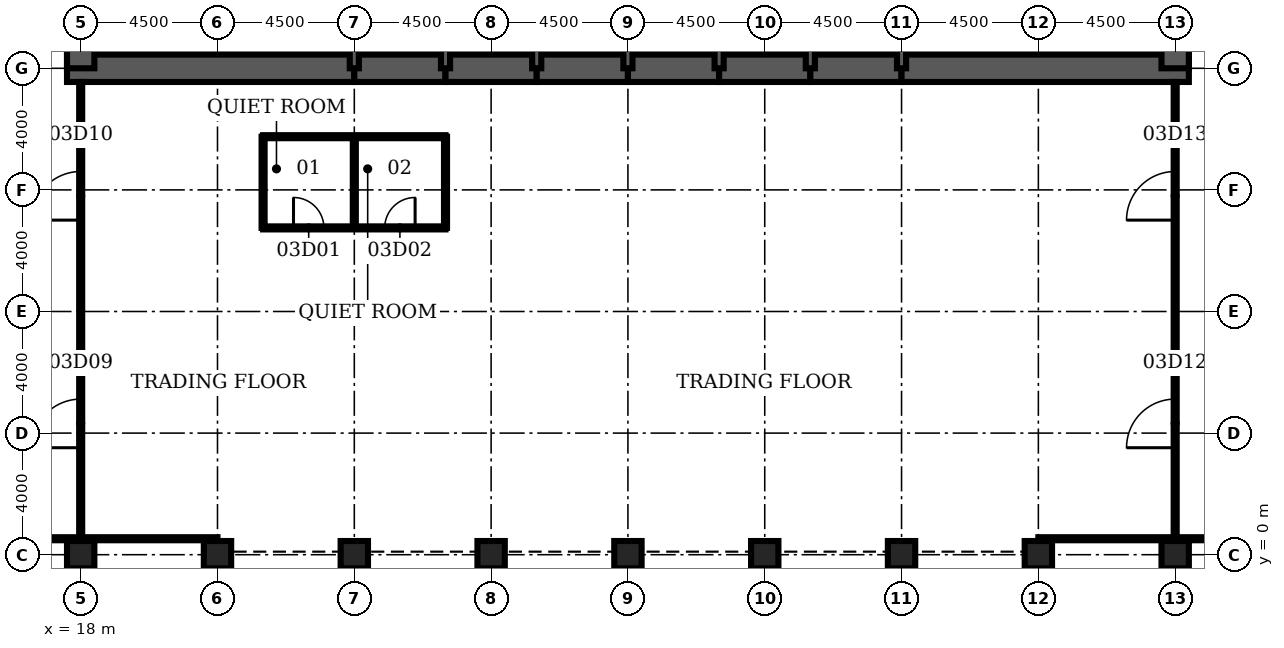
"""IFC4 building model, lengths in metres.
Left out: names, types, materials, properties, quantities, classifications, styles, units other than length and angle.
Written with IfcOpenShell. Run it as: python <this file> out.ifc"""

import sys

from ifc_helpers import new_model, si_unit, direction, frame, frame_2d, origin, origin_2d, place, context, subcontext, project, spatial, rectangle, hollow_rectangle, extrude, element, fill, save


model = new_model("IFC4")
c1 = context("Model", 3, precision=1e-05, world=origin(), true_north=direction((0.0, 1.0)))
c2 = subcontext(c1, "Body", "Model", "MODEL_VIEW")
j1 = project(units=[si_unit("LENGTHUNIT", "METRE"), si_unit("PLANEANGLEUNIT", "RADIAN")], contexts=[c1])
p1 = place(None, origin())
s1 = spatial("IfcSite", under=j1, at=p1, CompositionType="ELEMENT")
p2 = place(p1, origin())
s2 = spatial("IfcBuilding", under=s1, at=p2, CompositionType="ELEMENT")
p3 = place(p2, frame((0.0, 0.0, 18.0)))
s3 = spatial("IfcBuildingStorey", under=s2, at=p3, CompositionType="ELEMENT", Elevation=18.0)
for number, where, z_axis, x_axis in (
    (1, (18.0, 0.0, 0.0), (0.0, 0.0, 1.0), (0.0, 1.0, 0.0)),
    (2, (22.5, 0.0, 0.0), (0.0, 0.0, 1.0), (0.0, 1.0, 0.0)),
    (3, (27.0, 0.0, 0.0), (0.0, 0.0, 1.0), (0.0, 1.0, 0.0)),
    (4, (31.5, 0.0, 0.0), (0.0, 0.0, 1.0), (0.0, 1.0, 0.0)),
    (5, (36.0, 0.0, 0.0), (0.0, 0.0, 1.0), (0.0, 1.0, 0.0)),
    (6, (40.5, 0.0, 0.0), (0.0, 0.0, 1.0), (0.0, 1.0, 0.0)),
    (7, (45.0, 0.0, 0.0), (0.0, 0.0, 1.0), (0.0, 1.0, 0.0)),
    (8, (49.5, 0.0, 0.0), (0.0, 0.0, 1.0), (0.0, 1.0, 0.0)),
    (9, (54.0, 0.0, 0.0), (0.0, 0.0, 1.0), (0.0, 1.0, 0.0)),
):
    element("IfcColumn", number, at=place(p3, frame(where, z_axis=z_axis, x_axis=x_axis)), inside=s3, PredefinedType="COLUMN", context=c2, shape_type="SweptSolid", body=[
        extrude(hollow_rectangle(XDim=0.9, YDim=0.9, WallThickness=0.12, at=origin_2d()), origin(), (0.0, 0.0, 1.0), 5.0),
    ])
p4 = place(p3, frame((17.55, 16.0, 0.0), z_axis=(0.0, 0.0, 1.0), x_axis=(1.0, 0.0, 0.0)))
e10 = element("IfcWall", 10, at=p4, inside=s3, PredefinedType="SHEAR", context=c2, shape_type="SweptSolid", body=[
    extrude(rectangle(XDim=9.45, YDim=0.9, at=frame_2d((4.725, 0.0))), origin(), (0.0, 0.0, 1.0), 5.0),
])
for number, where, z_axis, x_axis in (
    (11, (27.0, 16.0, 0.0), (0.0, 0.0, 1.0), (1.0, 0.0, 0.0)),
    (12, (30.0, 16.0, 0.0), (0.0, 0.0, 1.0), (1.0, 0.0, 0.0)),
    (13, (33.0, 16.0, 0.0), (0.0, 0.0, 1.0), (1.0, 0.0, 0.0)),
    (14, (36.0, 16.0, 0.0), (0.0, 0.0, 1.0), (1.0, 0.0, 0.0)),
    (15, (39.0, 16.0, 0.0), (0.0, 0.0, 1.0), (1.0, 0.0, 0.0)),
    (16, (42.0, 16.0, 0.0), (0.0, 0.0, 1.0), (1.0, 0.0, 0.0)),
):
    element("IfcWall", number, at=place(p3, frame(where, z_axis=z_axis, x_axis=x_axis)), inside=s3, PredefinedType="SHEAR", context=c2, shape_type="SweptSolid", body=[
        extrude(rectangle(XDim=3.0, YDim=0.9, at=frame_2d((1.5, 0.0))), origin(), (0.0, 0.0, 1.0), 5.0),
    ])
p5 = place(p3, frame((45.0, 16.0, 0.0), z_axis=(0.0, 0.0, 1.0), x_axis=(1.0, 0.0, 0.0)))
e17 = element("IfcWall", 17, at=p5, inside=s3, PredefinedType="SHEAR", context=c2, shape_type="SweptSolid", body=[
    extrude(rectangle(XDim=9.45, YDim=0.9, at=frame_2d((4.725, 0.0))), origin(), (0.0, 0.0, 1.0), 5.0),
])
for number, where, z_axis, x_axis in (
    (18, (18.0, 19.2, 0.0), (0.0, 0.0, 1.0), (0.0, -1.0, 0.0)),
    (19, (54.0, 16.0, 0.0), (0.0, 0.0, 1.0), (0.0, 1.0, 0.0)),
):
    element("IfcWall", number, at=place(p3, frame(where, z_axis=z_axis, x_axis=x_axis)), inside=s3, PredefinedType="SHEAR", context=c2, shape_type="SweptSolid", body=[
        extrude(rectangle(XDim=3.2, YDim=0.9, at=frame_2d((1.6, 0.0))), origin(), (0.0, 0.0, 1.0), 5.0),
    ])
for number, where, z_axis, x_axis in (
    (20, (27.0, 16.0, 0.0), (0.0, 0.0, 1.0), (0.0, 1.0, 0.0)),
    (21, (30.0, 16.0, 0.0), (0.0, 0.0, 1.0), (0.0, 1.0, 0.0)),
    (22, (33.0, 16.0, 0.0), (0.0, 0.0, 1.0), (0.0, 1.0, 0.0)),
    (23, (36.0, 16.0, 0.0), (0.0, 0.0, 1.0), (0.0, 1.0, 0.0)),
    (24, (39.0, 16.0, 0.0), (0.0, 0.0, 1.0), (0.0, 1.0, 0.0)),
    (25, (42.0, 16.0, 0.0), (0.0, 0.0, 1.0), (0.0, 1.0, 0.0)),
    (26, (45.0, 16.0, 0.0), (0.0, 0.0, 1.0), (0.0, 1.0, 0.0)),
):
    element("IfcWall", number, at=place(p3, frame(where, z_axis=z_axis, x_axis=x_axis)), inside=s3, PredefinedType="SOLIDWALL", context=c2, shape_type="SweptSolid", body=[
        extrude(rectangle(XDim=3.2, YDim=0.3, at=frame_2d((1.6, 0.0))), origin(), (0.0, 0.0, 1.0), 5.0),
    ])
p6 = place(p3, frame((24.0, 10.75, 0.0), z_axis=(0.0, 0.0, 1.0), x_axis=(1.0, 0.0, 0.0)))
e27 = element("IfcWall", 27, at=p6, inside=s3, PredefinedType="PARTITIONING", context=c2, shape_type="SweptSolid", body=[
    extrude(rectangle(XDim=6.0, YDim=0.1, at=frame_2d((3.0, 0.0))), origin(), (0.0, 0.0, 1.0), 3.0),
])
p7 = place(p6, frame((1.0, 0.0, 0.0)))
e28 = element("IfcOpeningElement", 28, at=p7, cuts=e27, PredefinedType="OPENING", context=c2, shape_type="SweptSolid", body=[
    extrude(rectangle(XDim=1.0, YDim=2.1, at=frame_2d((0.5, 1.05))), frame((0.0, 0.06, 0.0), z_axis=(0.0, -1.0, 0.0), x_axis=(1.0, 0.0, 0.0)), (0.0, 0.0, 1.0), 0.12),
])
p8 = place(p6, frame((4.0, 0.0, 0.0)))
e29 = element("IfcOpeningElement", 29, at=p8, cuts=e27, PredefinedType="OPENING", context=c2, shape_type="SweptSolid", body=[
    extrude(rectangle(XDim=1.0, YDim=2.1, at=frame_2d((0.5, 1.05))), frame((0.0, 0.06, 0.0), z_axis=(0.0, -1.0, 0.0), x_axis=(1.0, 0.0, 0.0)), (0.0, 0.0, 1.0), 0.12),
])
p9 = place(p3, frame((24.0, 13.75, 0.0), z_axis=(0.0, 0.0, 1.0), x_axis=(1.0, 0.0, 0.0)))
e30 = element("IfcWall", 30, at=p9, inside=s3, PredefinedType="PARTITIONING", context=c2, shape_type="SweptSolid", body=[
    extrude(rectangle(XDim=6.0, YDim=0.1, at=frame_2d((3.0, 0.0))), origin(), (0.0, 0.0, 1.0), 3.0),
])
p10 = place(p3, frame((18.0, 0.575, 0.0), z_axis=(0.0, 0.0, 1.0), x_axis=(0.0, 1.0, 0.0)))
e31 = element("IfcWall", 31, at=p10, inside=s3, PredefinedType="PARTITIONING", context=c2, shape_type="SweptSolid", body=[
    extrude(rectangle(XDim=14.975, YDim=0.1, at=frame_2d((7.488, 0.0))), origin(), (0.0, 0.0, 1.0), 3.0),
])
p11 = place(p10, frame((2.944, 0.0, 0.0)))
e32 = element("IfcOpeningElement", 32, at=p11, cuts=e31, PredefinedType="OPENING", context=c2, shape_type="SweptSolid", body=[
    extrude(rectangle(XDim=1.6, YDim=2.1, at=frame_2d((0.8, 1.05))), frame((0.0, 0.06, 0.0), z_axis=(0.0, -1.0, 0.0), x_axis=(1.0, 0.0, 0.0)), (0.0, 0.0, 1.0), 0.12),
])
p12 = place(p10, frame((10.431, 0.0, 0.0)))
e33 = element("IfcOpeningElement", 33, at=p12, cuts=e31, PredefinedType="OPENING", context=c2, shape_type="SweptSolid", body=[
    extrude(rectangle(XDim=1.6, YDim=2.1, at=frame_2d((0.8, 1.05))), frame((0.0, 0.06, 0.0), z_axis=(0.0, -1.0, 0.0), x_axis=(1.0, 0.0, 0.0)), (0.0, 0.0, 1.0), 0.12),
])
for number, where, z_axis, x_axis in (
    (34, (24.0, 10.75, 0.0), (0.0, 0.0, 1.0), (0.0, 1.0, 0.0)),
    (35, (27.0, 10.75, 0.0), (0.0, 0.0, 1.0), (0.0, 1.0, 0.0)),
    (36, (30.0, 10.75, 0.0), (0.0, 0.0, 1.0), (0.0, 1.0, 0.0)),
):
    element("IfcWall", number, at=place(p3, frame(where, z_axis=z_axis, x_axis=x_axis)), inside=s3, PredefinedType="PARTITIONING", context=c2, shape_type="SweptSolid", body=[
        extrude(rectangle(XDim=3.0, YDim=0.1, at=frame_2d((1.5, 0.0))), origin(), (0.0, 0.0, 1.0), 3.0),
    ])
p13 = place(p3, frame((54.0, 0.575, 0.0), z_axis=(0.0, 0.0, 1.0), x_axis=(0.0, 1.0, 0.0)))
e37 = element("IfcWall", 37, at=p13, inside=s3, PredefinedType="PARTITIONING", context=c2, shape_type="SweptSolid", body=[
    extrude(rectangle(XDim=14.975, YDim=0.1, at=frame_2d((7.488, 0.0))), origin(), (0.0, 0.0, 1.0), 3.0),
])
p14 = place(p13, frame((2.944, 0.0, 0.0)))
e38 = element("IfcOpeningElement", 38, at=p14, cuts=e37, PredefinedType="OPENING", context=c2, shape_type="SweptSolid", body=[
    extrude(rectangle(XDim=1.6, YDim=2.1, at=frame_2d((0.8, 1.05))), frame((0.0, 0.06, 0.0), z_axis=(0.0, -1.0, 0.0), x_axis=(1.0, 0.0, 0.0)), (0.0, 0.0, 1.0), 0.12),
])
p15 = place(p13, frame((10.431, 0.0, 0.0)))
e39 = element("IfcOpeningElement", 39, at=p15, cuts=e37, PredefinedType="OPENING", context=c2, shape_type="SweptSolid", body=[
    extrude(rectangle(XDim=1.6, YDim=2.1, at=frame_2d((0.8, 1.05))), frame((0.0, 0.06, 0.0), z_axis=(0.0, -1.0, 0.0), x_axis=(1.0, 0.0, 0.0)), (0.0, 0.0, 1.0), 0.12),
])
p16 = place(p3, frame((4.3, 0.525, 0.0), z_axis=(0.0, 0.0, 1.0), x_axis=(1.0, 0.0, 0.0)))
e40 = element("IfcWall", 40, at=p16, inside=s3, PredefinedType="PARTITIONING", context=c2, shape_type="SweptSolid", body=[
    extrude(rectangle(XDim=18.2, YDim=0.1, at=frame_2d((9.1, 0.0))), origin(), (0.0, 0.0, 1.0), 3.0),
])
p17 = place(p16, frame((6.15, 0.0, 0.0)))
e41 = element("IfcOpeningElement", 41, at=p17, cuts=e40, PredefinedType="OPENING", context=c2, shape_type="SweptSolid", body=[
    extrude(rectangle(XDim=1.6, YDim=2.1, at=frame_2d((0.8, 1.05))), frame((0.0, 0.06, 0.0), z_axis=(0.0, -1.0, 0.0), x_axis=(1.0, 0.0, 0.0)), (0.0, 0.0, 1.0), 0.12),
])
p18 = place(p3, frame((49.5, 0.525, 0.0), z_axis=(0.0, 0.0, 1.0), x_axis=(1.0, 0.0, 0.0)))
e42 = element("IfcWall", 42, at=p18, inside=s3, PredefinedType="PARTITIONING", context=c2, shape_type="SweptSolid", body=[
    extrude(rectangle(XDim=18.2, YDim=0.1, at=frame_2d((9.1, 0.0))), origin(), (0.0, 0.0, 1.0), 3.0),
])
p19 = place(p18, frame((10.45, 0.0, 0.0)))
e43 = element("IfcOpeningElement", 43, at=p19, cuts=e42, PredefinedType="OPENING", context=c2, shape_type="SweptSolid", body=[
    extrude(rectangle(XDim=1.6, YDim=2.1, at=frame_2d((0.8, 1.05))), frame((0.0, 0.06, 0.0), z_axis=(0.0, -1.0, 0.0), x_axis=(1.0, 0.0, 0.0)), (0.0, 0.0, 1.0), 0.12),
])
p20 = place(p7, origin())
e44 = element("IfcDoor", 44, at=p20, inside=s3, OperationType="SINGLE_SWING_LEFT", PredefinedType="DOOR", context=c2, shape_type="SweptSolid", body=[
    extrude(rectangle(XDim=1.0, YDim=2.1, at=frame_2d((0.5, 1.05))), frame((0.0, 0.025, 0.0), z_axis=(0.0, -1.0, 0.0), x_axis=(1.0, 0.0, 0.0)), (0.0, 0.0, 1.0), 0.05),
])
fill(e28, e44)
p21 = place(p8, origin())
e45 = element("IfcDoor", 45, at=p21, inside=s3, OperationType="SINGLE_SWING_RIGHT", PredefinedType="DOOR", context=c2, shape_type="SweptSolid", body=[
    extrude(rectangle(XDim=1.0, YDim=2.1, at=frame_2d((0.5, 1.05))), frame((0.0, 0.025, 0.0), z_axis=(0.0, -1.0, 0.0), x_axis=(1.0, 0.0, 0.0)), (0.0, 0.0, 1.0), 0.05),
])
fill(e29, e45)
p22 = place(p11, origin())
e46 = element("IfcDoor", 46, at=p22, inside=s3, OperationType="SINGLE_SWING_LEFT", PredefinedType="DOOR", context=c2, shape_type="SweptSolid", body=[
    extrude(rectangle(XDim=1.6, YDim=2.1, at=frame_2d((0.8, 1.05))), frame((0.0, 0.025, 0.0), z_axis=(0.0, -1.0, 0.0), x_axis=(1.0, 0.0, 0.0)), (0.0, 0.0, 1.0), 0.05),
])
fill(e32, e46)
p23 = place(p12, origin())
e47 = element("IfcDoor", 47, at=p23, inside=s3, OperationType="SINGLE_SWING_LEFT", PredefinedType="DOOR", context=c2, shape_type="SweptSolid", body=[
    extrude(rectangle(XDim=1.6, YDim=2.1, at=frame_2d((0.8, 1.05))), frame((0.0, 0.025, 0.0), z_axis=(0.0, -1.0, 0.0), x_axis=(1.0, 0.0, 0.0)), (0.0, 0.0, 1.0), 0.05),
])
fill(e33, e47)
p24 = place(p14, origin())
e48 = element("IfcDoor", 48, at=p24, inside=s3, OperationType="SINGLE_SWING_LEFT", PredefinedType="DOOR", context=c2, shape_type="SweptSolid", body=[
    extrude(rectangle(XDim=1.6, YDim=2.1, at=frame_2d((0.8, 1.05))), frame((0.0, 0.025, 0.0), z_axis=(0.0, -1.0, 0.0), x_axis=(1.0, 0.0, 0.0)), (0.0, 0.0, 1.0), 0.05),
])
fill(e38, e48)
p25 = place(p15, origin())
e49 = element("IfcDoor", 49, at=p25, inside=s3, OperationType="SINGLE_SWING_LEFT", PredefinedType="DOOR", context=c2, shape_type="SweptSolid", body=[
    extrude(rectangle(XDim=1.6, YDim=2.1, at=frame_2d((0.8, 1.05))), frame((0.0, 0.025, 0.0), z_axis=(0.0, -1.0, 0.0), x_axis=(1.0, 0.0, 0.0)), (0.0, 0.0, 1.0), 0.05),
])
fill(e39, e49)
save(model, sys.argv[1])
